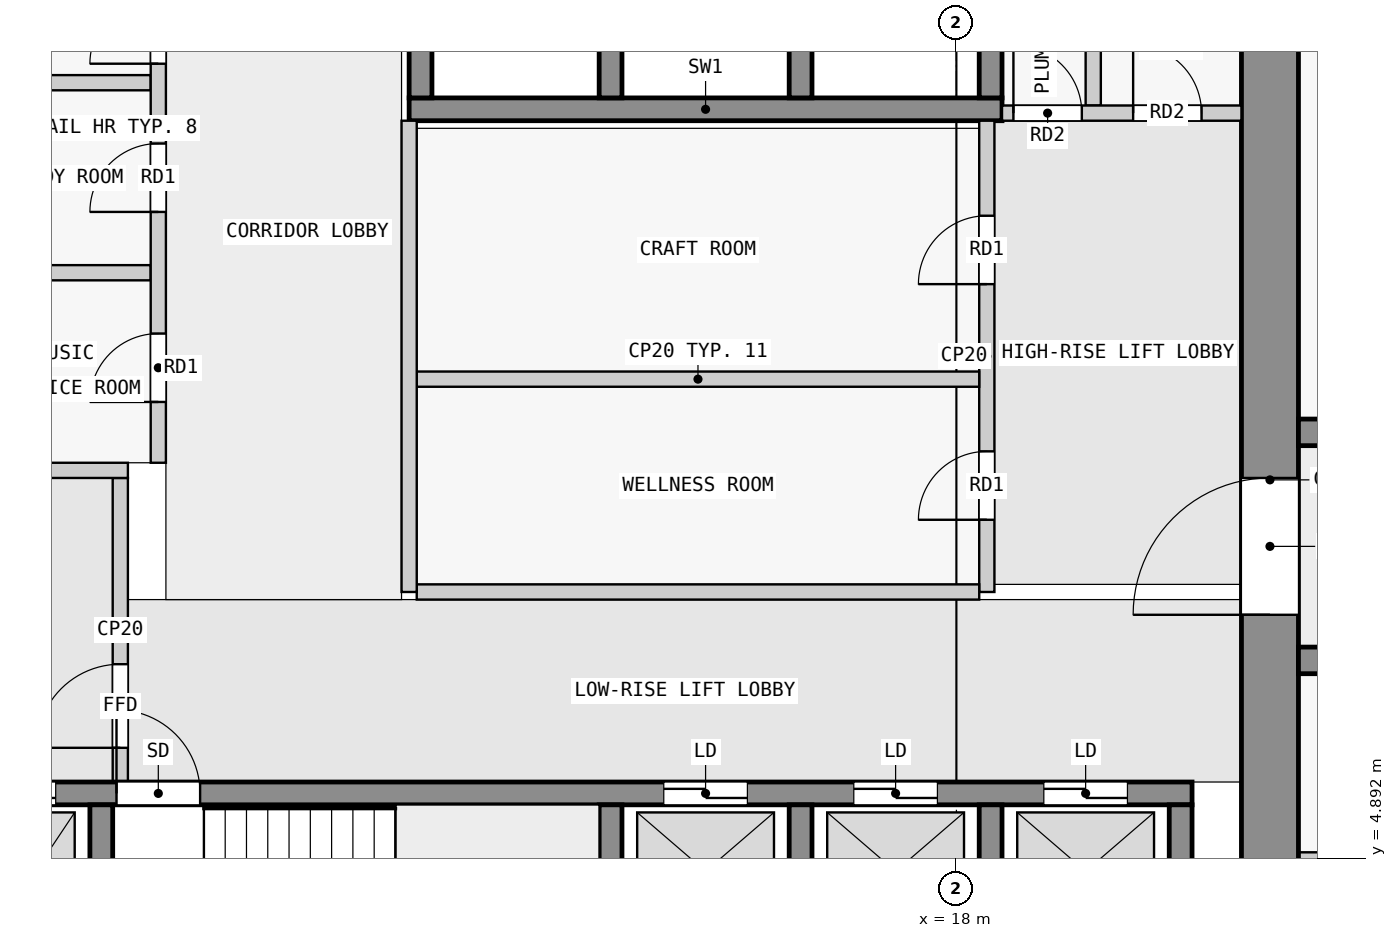
"""IFC4 building model, lengths in metres.
Left out: names, types, materials, properties, quantities, classifications, styles, units other than length and angle.
Written with IfcOpenShell. Run it as: python <this file> out.ifc"""

import sys

from ifc_helpers import new_model, si_unit, direction, frame, frame_2d, origin, place, context, subcontext, project, spatial, rectangle, extrude, element, fill, save


model = new_model("IFC4")
c1 = context("Model", 3, precision=1e-05, world=origin(), true_north=direction((0.0, 1.0)))
c2 = subcontext(c1, "Body", "Model", "MODEL_VIEW")
j1 = project(units=[si_unit("LENGTHUNIT", "METRE"), si_unit("PLANEANGLEUNIT", "RADIAN")], contexts=[c1])
p1 = place(None, origin())
s1 = spatial("IfcSite", under=j1, at=p1, CompositionType="ELEMENT")
p2 = place(p1, origin())
s2 = spatial("IfcBuilding", under=s1, at=p2, CompositionType="ELEMENT")
p3 = place(p2, frame((0.0, 0.0, 58.3)))
s3 = spatial("IfcBuildingStorey", under=s2, at=p3, CompositionType="ELEMENT", Elevation=58.3)
p4 = place(p3, frame((22.125, 2.5, 0.0), z_axis=(0.0, 0.0, 1.0), x_axis=(0.0, 1.0, 0.0)))
e1 = element("IfcWall", 1, at=p4, inside=s3, PredefinedType="SHEAR", context=c2, shape_type="SweptSolid", body=[
    extrude(rectangle(XDim=14.75, YDim=0.75, at=frame_2d((7.375, 0.0))), origin(), (0.0, 0.0, 1.0), 3.25),
])
p5 = place(p4, frame((5.6, 0.0, 0.0)))
e2 = element("IfcOpeningElement", 2, at=p5, cuts=e1, PredefinedType="OPENING", context=c2, shape_type="SweptSolid", body=[
    extrude(rectangle(XDim=1.8, YDim=2.1, at=frame_2d((0.9, 1.05))), frame((0.0, 0.385, 0.0), z_axis=(0.0, -1.0, 0.0), x_axis=(1.0, 0.0, 0.0)), (0.0, 0.0, 1.0), 0.77),
])
for number, where, z_axis, x_axis in (
    (3, (6.75, 2.8, 0.0), (0.0, 0.0, 1.0), (0.0, 1.0, 0.0)),
    (4, (13.45, 2.8, 0.0), (0.0, 0.0, 1.0), (0.0, 1.0, 0.0)),
    (5, (15.95, 2.8, 0.0), (0.0, 0.0, 1.0), (0.0, 1.0, 0.0)),
    (6, (18.45, 2.8, 0.0), (0.0, 0.0, 1.0), (0.0, 1.0, 0.0)),
    (7, (20.95, 2.8, 0.0), (0.0, 0.0, 1.0), (0.0, 1.0, 0.0)),
):
    element("IfcWall", number, at=place(p3, frame(where, z_axis=z_axis, x_axis=x_axis)), inside=s3, PredefinedType="SHEAR", context=c2, shape_type="SweptSolid", body=[
        extrude(rectangle(XDim=2.8, YDim=0.3, at=frame_2d((1.4, 0.0))), origin(), (0.0, 0.0, 1.0), 3.25),
    ])
p6 = place(p3, frame((2.3, 5.75, 0.0), z_axis=(0.0, 0.0, 1.0), x_axis=(1.0, 0.0, 0.0)))
e8 = element("IfcWall", 8, at=p6, inside=s3, PredefinedType="SHEAR", context=c2, shape_type="SweptSolid", body=[
    extrude(rectangle(XDim=18.8, YDim=0.3, at=frame_2d((9.4, 0.0))), origin(), (0.0, 0.0, 1.0), 3.25),
])
p7 = place(p6, frame((4.65, 0.0, 0.0)))
e9 = element("IfcOpeningElement", 9, at=p7, cuts=e8, PredefinedType="OPENING", context=c2, shape_type="SweptSolid", body=[
    extrude(rectangle(XDim=1.1, YDim=2.1, at=frame_2d((0.55, 1.05))), frame((0.0, 0.16, 0.0), z_axis=(0.0, -1.0, 0.0), x_axis=(1.0, 0.0, 0.0)), (0.0, 0.0, 1.0), 0.32),
])
p8 = place(p6, frame((0.45, 0.0, 0.0)))
e10 = element("IfcOpeningElement", 10, at=p8, cuts=e8, PredefinedType="OPENING", context=c2, shape_type="SweptSolid", body=[
    extrude(rectangle(XDim=1.1, YDim=2.1, at=frame_2d((0.55, 1.05))), frame((0.0, 0.16, 0.0), z_axis=(0.0, -1.0, 0.0), x_axis=(1.0, 0.0, 0.0)), (0.0, 0.0, 1.0), 0.32),
])
p9 = place(p6, frame((2.75, 0.0, 0.0)))
e11 = element("IfcOpeningElement", 11, at=p9, cuts=e8, PredefinedType="OPENING", context=c2, shape_type="SweptSolid", body=[
    extrude(rectangle(XDim=1.1, YDim=2.1, at=frame_2d((0.55, 1.05))), frame((0.0, 0.16, 0.0), z_axis=(0.0, -1.0, 0.0), x_axis=(1.0, 0.0, 0.0)), (0.0, 0.0, 1.0), 0.32),
])
p10 = place(p6, frame((11.85, 0.0, 0.0)))
e12 = element("IfcOpeningElement", 12, at=p10, cuts=e8, PredefinedType="OPENING", context=c2, shape_type="SweptSolid", body=[
    extrude(rectangle(XDim=1.1, YDim=2.1, at=frame_2d((0.55, 1.05))), frame((0.0, 0.16, 0.0), z_axis=(0.0, -1.0, 0.0), x_axis=(1.0, 0.0, 0.0)), (0.0, 0.0, 1.0), 0.32),
])
p11 = place(p6, frame((14.35, 0.0, 0.0)))
e13 = element("IfcOpeningElement", 13, at=p11, cuts=e8, PredefinedType="OPENING", context=c2, shape_type="SweptSolid", body=[
    extrude(rectangle(XDim=1.1, YDim=2.1, at=frame_2d((0.55, 1.05))), frame((0.0, 0.16, 0.0), z_axis=(0.0, -1.0, 0.0), x_axis=(1.0, 0.0, 0.0)), (0.0, 0.0, 1.0), 0.32),
])
p12 = place(p6, frame((16.85, 0.0, 0.0)))
e14 = element("IfcOpeningElement", 14, at=p12, cuts=e8, PredefinedType="OPENING", context=c2, shape_type="SweptSolid", body=[
    extrude(rectangle(XDim=1.1, YDim=2.1, at=frame_2d((0.55, 1.05))), frame((0.0, 0.16, 0.0), z_axis=(0.0, -1.0, 0.0), x_axis=(1.0, 0.0, 0.0)), (0.0, 0.0, 1.0), 0.32),
])
p13 = place(p3, frame((10.8, 14.75, 0.0), z_axis=(0.0, 0.0, 1.0), x_axis=(1.0, 0.0, 0.0)))
e15 = element("IfcWall", 15, at=p13, inside=s3, PredefinedType="SHEAR", context=c2, shape_type="SweptSolid", body=[
    extrude(rectangle(XDim=7.8, YDim=0.3, at=frame_2d((3.9, 0.0))), origin(), (0.0, 0.0, 1.0), 3.25),
])
for number, where, z_axis, x_axis in (
    (16, (10.95, 14.9, 0.0), (0.0, 0.0, 1.0), (0.0, 1.0, 0.0)),
    (17, (13.45, 14.9, 0.0), (0.0, 0.0, 1.0), (0.0, 1.0, 0.0)),
    (18, (15.95, 14.9, 0.0), (0.0, 0.0, 1.0), (0.0, 1.0, 0.0)),
    (19, (18.45, 14.9, 0.0), (0.0, 0.0, 1.0), (0.0, 1.0, 0.0)),
):
    element("IfcWall", number, at=place(p3, frame(where, z_axis=z_axis, x_axis=x_axis)), inside=s3, PredefinedType="SHEAR", context=c2, shape_type="SweptSolid", body=[
        extrude(rectangle(XDim=2.0, YDim=0.3, at=frame_2d((1.0, 0.0))), origin(), (0.0, 0.0, 1.0), 3.25),
    ])
p14 = place(p3, frame((22.5, 7.5, 0.0), z_axis=(0.0, 0.0, 1.0), x_axis=(1.0, 0.0, 0.0)))
e20 = element("IfcWall", 20, at=p14, inside=s3, PredefinedType="SHEAR", context=c2, shape_type="SweptSolid", body=[
    extrude(rectangle(XDim=22.5, YDim=0.35, at=frame_2d((11.25, 0.0))), origin(), (0.0, 0.0, 1.0), 3.25),
])
p15 = place(p14, frame((1.75, 0.0, 0.0)))
e21 = element("IfcOpeningElement", 21, at=p15, cuts=e20, PredefinedType="OPENING", context=c2, shape_type="SweptSolid", body=[
    extrude(rectangle(XDim=1.0, YDim=2.1, at=frame_2d((0.5, 1.05))), frame((0.0, 0.185, 0.0), z_axis=(0.0, -1.0, 0.0), x_axis=(1.0, 0.0, 0.0)), (0.0, 0.0, 1.0), 0.37),
])
p16 = place(p14, frame((8.55, 0.0, 0.0)))
e22 = element("IfcOpeningElement", 22, at=p16, cuts=e20, PredefinedType="OPENING", context=c2, shape_type="SweptSolid", body=[
    extrude(rectangle(XDim=1.0, YDim=2.1, at=frame_2d((0.5, 1.05))), frame((0.0, 0.185, 0.0), z_axis=(0.0, -1.0, 0.0), x_axis=(1.0, 0.0, 0.0)), (0.0, 0.0, 1.0), 0.37),
])
p17 = place(p14, frame((15.25, 0.0, 0.0)))
e23 = element("IfcOpeningElement", 23, at=p17, cuts=e20, PredefinedType="OPENING", context=c2, shape_type="SweptSolid", body=[
    extrude(rectangle(XDim=1.0, YDim=2.1, at=frame_2d((0.5, 1.05))), frame((0.0, 0.185, 0.0), z_axis=(0.0, -1.0, 0.0), x_axis=(1.0, 0.0, 0.0)), (0.0, 0.0, 1.0), 0.37),
])
p18 = place(p14, frame((18.75, 0.0, 0.0)))
e24 = element("IfcOpeningElement", 24, at=p18, cuts=e20, PredefinedType="OPENING", context=c2, shape_type="SweptSolid", body=[
    extrude(rectangle(XDim=0.9, YDim=2.1, at=frame_2d((0.45, 1.05))), frame((0.0, 0.185, 0.0), z_axis=(0.0, -1.0, 0.0), x_axis=(1.0, 0.0, 0.0)), (0.0, 0.0, 1.0), 0.37),
])
p19 = place(p14, frame((20.95, 0.0, 0.0)))
e25 = element("IfcOpeningElement", 25, at=p19, cuts=e20, PredefinedType="OPENING", context=c2, shape_type="SweptSolid", body=[
    extrude(rectangle(XDim=1.0, YDim=2.1, at=frame_2d((0.5, 1.05))), frame((0.0, 0.185, 0.0), z_axis=(0.0, -1.0, 0.0), x_axis=(1.0, 0.0, 0.0)), (0.0, 0.0, 1.0), 0.37),
])
p20 = place(p3, frame((22.5, 10.5, 0.0), z_axis=(0.0, 0.0, 1.0), x_axis=(1.0, 0.0, 0.0)))
e26 = element("IfcWall", 26, at=p20, inside=s3, PredefinedType="SHEAR", context=c2, shape_type="SweptSolid", body=[
    extrude(rectangle(XDim=22.5, YDim=0.35, at=frame_2d((11.25, 0.0))), origin(), (0.0, 0.0, 1.0), 3.25),
])
p21 = place(p20, frame((1.75, 0.0, 0.0)))
e27 = element("IfcOpeningElement", 27, at=p21, cuts=e26, PredefinedType="OPENING", context=c2, shape_type="SweptSolid", body=[
    extrude(rectangle(XDim=1.0, YDim=2.1, at=frame_2d((0.5, 1.05))), frame((0.0, 0.185, 0.0), z_axis=(0.0, -1.0, 0.0), x_axis=(1.0, 0.0, 0.0)), (0.0, 0.0, 1.0), 0.37),
])
p22 = place(p20, frame((6.25, 0.0, 0.0)))
e28 = element("IfcOpeningElement", 28, at=p22, cuts=e26, PredefinedType="OPENING", context=c2, shape_type="SweptSolid", body=[
    extrude(rectangle(XDim=1.0, YDim=2.1, at=frame_2d((0.5, 1.05))), frame((0.0, 0.185, 0.0), z_axis=(0.0, -1.0, 0.0), x_axis=(1.0, 0.0, 0.0)), (0.0, 0.0, 1.0), 0.37),
])
p23 = place(p20, frame((10.75, 0.0, 0.0)))
e29 = element("IfcOpeningElement", 29, at=p23, cuts=e26, PredefinedType="OPENING", context=c2, shape_type="SweptSolid", body=[
    extrude(rectangle(XDim=1.0, YDim=2.1, at=frame_2d((0.5, 1.05))), frame((0.0, 0.185, 0.0), z_axis=(0.0, -1.0, 0.0), x_axis=(1.0, 0.0, 0.0)), (0.0, 0.0, 1.0), 0.37),
])
p24 = place(p20, frame((16.85, 0.0, 0.0)))
e30 = element("IfcOpeningElement", 30, at=p24, cuts=e26, PredefinedType="OPENING", context=c2, shape_type="SweptSolid", body=[
    extrude(rectangle(XDim=1.0, YDim=2.1, at=frame_2d((0.5, 1.05))), frame((0.0, 0.185, 0.0), z_axis=(0.0, -1.0, 0.0), x_axis=(1.0, 0.0, 0.0)), (0.0, 0.0, 1.0), 0.37),
])
p25 = place(p3, frame((7.0, 5.9, 0.0), z_axis=(0.0, 0.0, 1.0), x_axis=(0.0, 1.0, 0.0)))
e31 = element("IfcWall", 31, at=p25, inside=s3, PredefinedType="PARTITIONING", context=c2, shape_type="SweptSolid", body=[
    extrude(rectangle(XDim=4.0, YDim=0.2, at=frame_2d((2.0, 0.0))), origin(), (0.0, 0.0, 1.0), 3.25),
])
p26 = place(p25, frame((0.45, 0.0, 0.0)))
e32 = element("IfcOpeningElement", 32, at=p26, cuts=e31, PredefinedType="OPENING", context=c2, shape_type="SweptSolid", body=[
    extrude(rectangle(XDim=1.1, YDim=2.1, at=frame_2d((0.55, 1.05))), frame((0.0, 0.11, 0.0), z_axis=(0.0, -1.0, 0.0), x_axis=(1.0, 0.0, 0.0)), (0.0, 0.0, 1.0), 0.22),
])
p27 = place(p3, frame((5.15, 10.0, 0.0), z_axis=(0.0, 0.0, 1.0), x_axis=(1.0, 0.0, 0.0)))
e33 = element("IfcWall", 33, at=p27, inside=s3, PredefinedType="PARTITIONING", context=c2, shape_type="SweptSolid", body=[
    extrude(rectangle(XDim=1.95, YDim=0.2, at=frame_2d((0.975, 0.0))), origin(), (0.0, 0.0, 1.0), 3.25),
])
p28 = place(p3, frame((10.8, 8.4, 0.0), z_axis=(0.0, 0.0, 1.0), x_axis=(0.0, 1.0, 0.0)))
e34 = element("IfcWall", 34, at=p28, inside=s3, PredefinedType="PARTITIONING", context=c2, shape_type="SweptSolid", body=[
    extrude(rectangle(XDim=6.2, YDim=0.2, at=frame_2d((3.1, 0.0))), origin(), (0.0, 0.0, 1.0), 3.25),
])
p29 = place(p3, frame((10.9, 8.4, 0.0), z_axis=(0.0, 0.0, 1.0), x_axis=(1.0, 0.0, 0.0)))
e35 = element("IfcWall", 35, at=p29, inside=s3, PredefinedType="PARTITIONING", context=c2, shape_type="SweptSolid", body=[
    extrude(rectangle(XDim=7.4, YDim=0.2, at=frame_2d((3.7, 0.0))), origin(), (0.0, 0.0, 1.0), 3.25),
])
p30 = place(p3, frame((18.4, 8.4, 0.0), z_axis=(0.0, 0.0, 1.0), x_axis=(0.0, 1.0, 0.0)))
e36 = element("IfcWall", 36, at=p30, inside=s3, PredefinedType="PARTITIONING", context=c2, shape_type="SweptSolid", body=[
    extrude(rectangle(XDim=6.2, YDim=0.2, at=frame_2d((3.1, 0.0))), origin(), (0.0, 0.0, 1.0), 3.25),
])
p31 = place(p30, frame((0.95, 0.0, 0.0)))
e37 = element("IfcOpeningElement", 37, at=p31, cuts=e36, PredefinedType="OPENING", context=c2, shape_type="SweptSolid", body=[
    extrude(rectangle(XDim=0.9, YDim=2.1, at=frame_2d((0.45, 1.05))), frame((0.0, 0.11, 0.0), z_axis=(0.0, -1.0, 0.0), x_axis=(1.0, 0.0, 0.0)), (0.0, 0.0, 1.0), 0.22),
])
p32 = place(p30, frame((4.05, 0.0, 0.0)))
e38 = element("IfcOpeningElement", 38, at=p32, cuts=e36, PredefinedType="OPENING", context=c2, shape_type="SweptSolid", body=[
    extrude(rectangle(XDim=0.9, YDim=2.1, at=frame_2d((0.45, 1.05))), frame((0.0, 0.11, 0.0), z_axis=(0.0, -1.0, 0.0), x_axis=(1.0, 0.0, 0.0)), (0.0, 0.0, 1.0), 0.22),
])
p33 = place(p3, frame((10.9, 11.2, 0.0), z_axis=(0.0, 0.0, 1.0), x_axis=(1.0, 0.0, 0.0)))
e39 = element("IfcWall", 39, at=p33, inside=s3, PredefinedType="PARTITIONING", context=c2, shape_type="SweptSolid", body=[
    extrude(rectangle(XDim=7.4, YDim=0.2, at=frame_2d((3.7, 0.0))), origin(), (0.0, 0.0, 1.0), 3.25),
])
p34 = place(p3, frame((7.5, 10.1, 0.0), z_axis=(0.0, 0.0, 1.0), x_axis=(0.0, 1.0, 0.0)))
e40 = element("IfcWall", 40, at=p34, inside=s3, PredefinedType="PARTITIONING", context=c2, shape_type="SweptSolid", body=[
    extrude(rectangle(XDim=7.15, YDim=0.2, at=frame_2d((3.575, 0.0))), origin(), (0.0, 0.0, 1.0), 3.25),
])
p35 = place(p34, frame((0.8, 0.0, 0.0)))
e41 = element("IfcOpeningElement", 41, at=p35, cuts=e40, PredefinedType="OPENING", context=c2, shape_type="SweptSolid", body=[
    extrude(rectangle(XDim=0.9, YDim=2.1, at=frame_2d((0.45, 1.05))), frame((0.0, 0.11, 0.0), z_axis=(0.0, -1.0, 0.0), x_axis=(1.0, 0.0, 0.0)), (0.0, 0.0, 1.0), 0.22),
])
p36 = place(p34, frame((3.3, 0.0, 0.0)))
e42 = element("IfcOpeningElement", 42, at=p36, cuts=e40, PredefinedType="OPENING", context=c2, shape_type="SweptSolid", body=[
    extrude(rectangle(XDim=0.9, YDim=2.1, at=frame_2d((0.45, 1.05))), frame((0.0, 0.11, 0.0), z_axis=(0.0, -1.0, 0.0), x_axis=(1.0, 0.0, 0.0)), (0.0, 0.0, 1.0), 0.22),
])
p37 = place(p34, frame((5.25, 0.0, 0.0)))
e43 = element("IfcOpeningElement", 43, at=p37, cuts=e40, PredefinedType="OPENING", context=c2, shape_type="SweptSolid", body=[
    extrude(rectangle(XDim=0.9, YDim=2.1, at=frame_2d((0.45, 1.05))), frame((0.0, 0.11, 0.0), z_axis=(0.0, -1.0, 0.0), x_axis=(1.0, 0.0, 0.0)), (0.0, 0.0, 1.0), 0.22),
])
for number, where, z_axis, x_axis in (
    (44, (5.15, 12.6, 0.0), (0.0, 0.0, 1.0), (1.0, 0.0, 0.0)),
    (45, (5.15, 15.1, 0.0), (0.0, 0.0, 1.0), (1.0, 0.0, 0.0)),
):
    element("IfcWall", number, at=place(p3, frame(where, z_axis=z_axis, x_axis=x_axis)), inside=s3, PredefinedType="PARTITIONING", context=c2, shape_type="SweptSolid", body=[
        extrude(rectangle(XDim=2.25, YDim=0.2, at=frame_2d((1.125, 0.0))), origin(), (0.0, 0.0, 1.0), 3.25),
    ])
p38 = place(p3, frame((18.6, 14.7, 0.0), z_axis=(0.0, 0.0, 1.0), x_axis=(1.0, 0.0, 0.0)))
e46 = element("IfcWall", 46, at=p38, inside=s3, PredefinedType="PARTITIONING", context=c2, shape_type="SweptSolid", body=[
    extrude(rectangle(XDim=3.15, YDim=0.2, at=frame_2d((1.575, 0.0))), origin(), (0.0, 0.0, 1.0), 3.25),
])
p39 = place(p38, frame((0.15, 0.0, 0.0)))
e47 = element("IfcOpeningElement", 47, at=p39, cuts=e46, PredefinedType="OPENING", context=c2, shape_type="SweptSolid", body=[
    extrude(rectangle(XDim=0.9, YDim=2.1, at=frame_2d((0.45, 1.05))), frame((0.0, 0.11, 0.0), z_axis=(0.0, -1.0, 0.0), x_axis=(1.0, 0.0, 0.0)), (0.0, 0.0, 1.0), 0.22),
])
p40 = place(p38, frame((1.725, 0.0, 0.0)))
e48 = element("IfcOpeningElement", 48, at=p40, cuts=e46, PredefinedType="OPENING", context=c2, shape_type="SweptSolid", body=[
    extrude(rectangle(XDim=0.9, YDim=2.1, at=frame_2d((0.45, 1.05))), frame((0.0, 0.11, 0.0), z_axis=(0.0, -1.0, 0.0), x_axis=(1.0, 0.0, 0.0)), (0.0, 0.0, 1.0), 0.22),
])
p41 = place(p3, frame((19.8, 14.8, 0.0), z_axis=(0.0, 0.0, 1.0), x_axis=(0.0, 1.0, 0.0)))
e49 = element("IfcWall", 49, at=p41, inside=s3, PredefinedType="PARTITIONING", context=c2, shape_type="SweptSolid", body=[
    extrude(rectangle(XDim=2.45, YDim=0.2, at=frame_2d((1.225, 0.0))), origin(), (0.0, 0.0, 1.0), 3.25),
])
p42 = place(p3, frame((22.5, 4.925, 0.0), z_axis=(0.0, 0.0, 1.0), x_axis=(1.0, 0.0, 0.0)))
e50 = element("IfcWall", 50, at=p42, inside=s3, PredefinedType="PARTITIONING", context=c2, shape_type="SweptSolid", body=[
    extrude(rectangle(XDim=1.45, YDim=0.1, at=frame_2d((0.725, 0.0))), origin(), (0.0, 0.0, 1.0), 3.25),
])
p43 = place(p26, origin())
e51 = element("IfcDoor", 51, at=p43, inside=s3, OperationType="SINGLE_SWING_LEFT", PredefinedType="DOOR", context=c2, shape_type="SweptSolid", body=[
    extrude(rectangle(XDim=1.1, YDim=2.1, at=frame_2d((0.55, 1.05))), frame((0.0, 0.025, 0.0), z_axis=(0.0, -1.0, 0.0), x_axis=(1.0, 0.0, 0.0)), (0.0, 0.0, 1.0), 0.05),
])
fill(e32, e51)
p44 = place(p31, origin())
e52 = element("IfcDoor", 52, at=p44, inside=s3, OperationType="SINGLE_SWING_LEFT", PredefinedType="DOOR", context=c2, shape_type="SweptSolid", body=[
    extrude(rectangle(XDim=0.9, YDim=2.1, at=frame_2d((0.45, 1.05))), frame((0.0, 0.025, 0.0), z_axis=(0.0, -1.0, 0.0), x_axis=(1.0, 0.0, 0.0)), (0.0, 0.0, 1.0), 0.05),
])
fill(e37, e52)
p45 = place(p32, origin())
e53 = element("IfcDoor", 53, at=p45, inside=s3, OperationType="SINGLE_SWING_LEFT", PredefinedType="DOOR", context=c2, shape_type="SweptSolid", body=[
    extrude(rectangle(XDim=0.9, YDim=2.1, at=frame_2d((0.45, 1.05))), frame((0.0, 0.025, 0.0), z_axis=(0.0, -1.0, 0.0), x_axis=(1.0, 0.0, 0.0)), (0.0, 0.0, 1.0), 0.05),
])
fill(e38, e53)
p46 = place(p7, origin())
e54 = element("IfcDoor", 54, at=p46, inside=s3, OperationType="SINGLE_SWING_LEFT", PredefinedType="DOOR", context=c2, shape_type="SweptSolid", body=[
    extrude(rectangle(XDim=1.1, YDim=2.1, at=frame_2d((0.55, 1.05))), frame((0.0, 0.025, 0.0), z_axis=(0.0, -1.0, 0.0), x_axis=(1.0, 0.0, 0.0)), (0.0, 0.0, 1.0), 0.05),
])
fill(e9, e54)
p47 = place(p9, origin())
e55 = element("IfcDoor", 55, at=p47, inside=s3, OperationType="DOUBLE_DOOR_SLIDING", PredefinedType="DOOR", context=c2, shape_type="SweptSolid", body=[
    extrude(rectangle(XDim=1.1, YDim=2.1, at=frame_2d((0.55, 1.05))), frame((0.0, 0.025, 0.0), z_axis=(0.0, -1.0, 0.0), x_axis=(1.0, 0.0, 0.0)), (0.0, 0.0, 1.0), 0.05),
])
fill(e11, e55)
p48 = place(p10, origin())
e56 = element("IfcDoor", 56, at=p48, inside=s3, OperationType="DOUBLE_DOOR_SLIDING", PredefinedType="DOOR", context=c2, shape_type="SweptSolid", body=[
    extrude(rectangle(XDim=1.1, YDim=2.1, at=frame_2d((0.55, 1.05))), frame((0.0, 0.025, 0.0), z_axis=(0.0, -1.0, 0.0), x_axis=(1.0, 0.0, 0.0)), (0.0, 0.0, 1.0), 0.05),
])
fill(e12, e56)
p49 = place(p11, origin())
e57 = element("IfcDoor", 57, at=p49, inside=s3, OperationType="DOUBLE_DOOR_SLIDING", PredefinedType="DOOR", context=c2, shape_type="SweptSolid", body=[
    extrude(rectangle(XDim=1.1, YDim=2.1, at=frame_2d((0.55, 1.05))), frame((0.0, 0.025, 0.0), z_axis=(0.0, -1.0, 0.0), x_axis=(1.0, 0.0, 0.0)), (0.0, 0.0, 1.0), 0.05),
])
fill(e13, e57)
p50 = place(p12, origin())
e58 = element("IfcDoor", 58, at=p50, inside=s3, OperationType="DOUBLE_DOOR_SLIDING", PredefinedType="DOOR", context=c2, shape_type="SweptSolid", body=[
    extrude(rectangle(XDim=1.1, YDim=2.1, at=frame_2d((0.55, 1.05))), frame((0.0, 0.025, 0.0), z_axis=(0.0, -1.0, 0.0), x_axis=(1.0, 0.0, 0.0)), (0.0, 0.0, 1.0), 0.05),
])
fill(e14, e58)
p51 = place(p5, origin())
e59 = element("IfcDoor", 59, at=p51, inside=s3, OperationType="DOUBLE_DOOR_SINGLE_SWING", PredefinedType="DOOR", context=c2, shape_type="SweptSolid", body=[
    extrude(rectangle(XDim=1.8, YDim=2.1, at=frame_2d((0.9, 1.05))), frame((0.0, 0.025, 0.0), z_axis=(0.0, -1.0, 0.0), x_axis=(1.0, 0.0, 0.0)), (0.0, 0.0, 1.0), 0.05),
])
fill(e2, e59)
p52 = place(p35, origin())
e60 = element("IfcDoor", 60, at=p52, inside=s3, OperationType="SINGLE_SWING_RIGHT", PredefinedType="DOOR", context=c2, shape_type="SweptSolid", body=[
    extrude(rectangle(XDim=0.9, YDim=2.1, at=frame_2d((0.45, 1.05))), frame((0.0, 0.025, 0.0), z_axis=(0.0, -1.0, 0.0), x_axis=(1.0, 0.0, 0.0)), (0.0, 0.0, 1.0), 0.05),
])
fill(e41, e60)
p53 = place(p36, origin())
e61 = element("IfcDoor", 61, at=p53, inside=s3, OperationType="SINGLE_SWING_RIGHT", PredefinedType="DOOR", context=c2, shape_type="SweptSolid", body=[
    extrude(rectangle(XDim=0.9, YDim=2.1, at=frame_2d((0.45, 1.05))), frame((0.0, 0.025, 0.0), z_axis=(0.0, -1.0, 0.0), x_axis=(1.0, 0.0, 0.0)), (0.0, 0.0, 1.0), 0.05),
])
fill(e42, e61)
p54 = place(p37, origin())
e62 = element("IfcDoor", 62, at=p54, inside=s3, OperationType="SINGLE_SWING_RIGHT", PredefinedType="DOOR", context=c2, shape_type="SweptSolid", body=[
    extrude(rectangle(XDim=0.9, YDim=2.1, at=frame_2d((0.45, 1.05))), frame((0.0, 0.025, 0.0), z_axis=(0.0, -1.0, 0.0), x_axis=(1.0, 0.0, 0.0)), (0.0, 0.0, 1.0), 0.05),
])
fill(e43, e62)
p55 = place(p39, origin())
e63 = element("IfcDoor", 63, at=p55, inside=s3, OperationType="SINGLE_SWING_LEFT", PredefinedType="DOOR", context=c2, shape_type="SweptSolid", body=[
    extrude(rectangle(XDim=0.9, YDim=2.1, at=frame_2d((0.45, 1.05))), frame((0.0, 0.025, 0.0), z_axis=(0.0, -1.0, 0.0), x_axis=(1.0, 0.0, 0.0)), (0.0, 0.0, 1.0), 0.05),
])
fill(e47, e63)
p56 = place(p40, origin())
e64 = element("IfcDoor", 64, at=p56, inside=s3, OperationType="SINGLE_SWING_LEFT", PredefinedType="DOOR", context=c2, shape_type="SweptSolid", body=[
    extrude(rectangle(XDim=0.9, YDim=2.1, at=frame_2d((0.45, 1.05))), frame((0.0, 0.025, 0.0), z_axis=(0.0, -1.0, 0.0), x_axis=(1.0, 0.0, 0.0)), (0.0, 0.0, 1.0), 0.05),
])
fill(e48, e64)
save(model, sys.argv[1])
